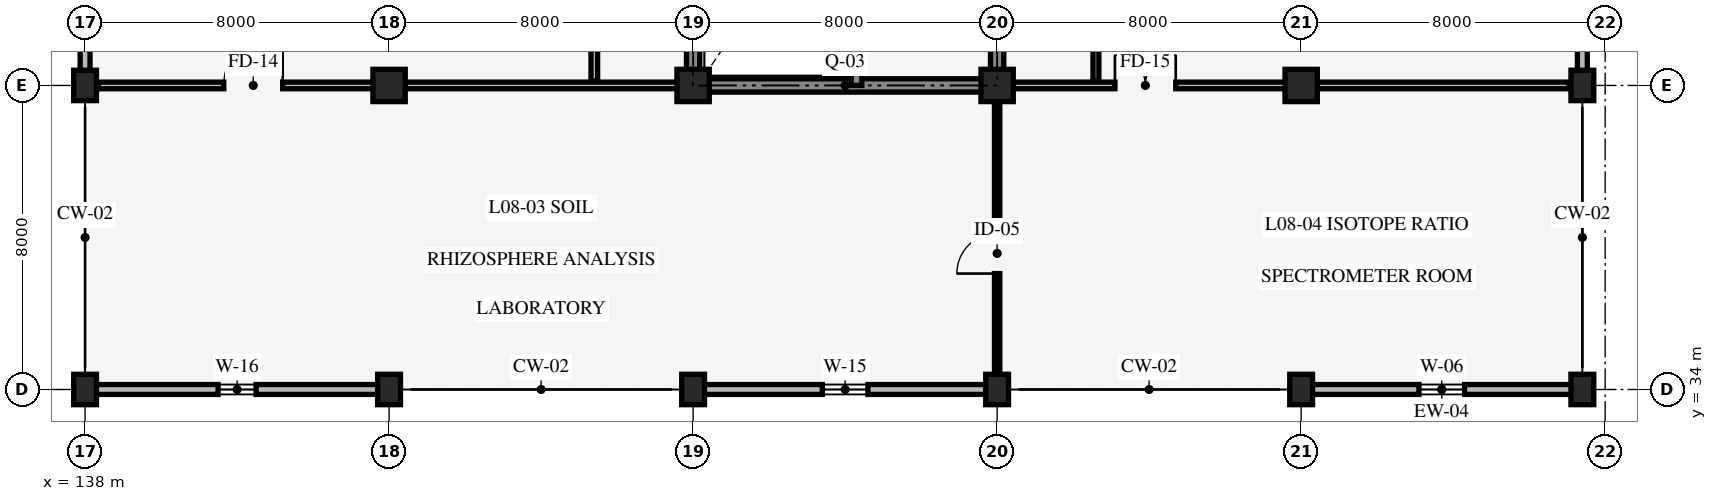
"""IFC4 building model, lengths in metres.
Left out: names, types, materials, properties, quantities, classifications, styles, units other than length and angle.
Written with IfcOpenShell. Run it as: python <this file> out.ifc"""

import sys

from ifc_helpers import new_model, si_unit, direction, frame, frame_2d, origin, origin_2d, place, context, subcontext, project, spatial, rectangle, extrude, element, fill, save


model = new_model("IFC4")
c1 = context("Model", 3, precision=1e-05, world=origin(), true_north=direction((0.0, 1.0)))
c2 = subcontext(c1, "Body", "Model", "MODEL_VIEW")
j1 = project(units=[si_unit("LENGTHUNIT", "METRE"), si_unit("PLANEANGLEUNIT", "RADIAN")], contexts=[c1])
p1 = place(None, origin())
s1 = spatial("IfcSite", under=j1, at=p1, CompositionType="ELEMENT")
p2 = place(p1, origin())
s2 = spatial("IfcBuilding", under=s1, at=p2, CompositionType="ELEMENT")
p3 = place(p2, frame((0.0, 0.0, 31.8)))
s3 = spatial("IfcBuildingStorey", under=s2, at=p3, CompositionType="ELEMENT", Elevation=31.8)
p4 = place(p3, frame((154.0, 42.0, 0.0), z_axis=(0.0, 0.0, 1.0), x_axis=(1.0, 0.0, 0.0)))
e1 = element("IfcWall", 1, at=p4, inside=s3, PredefinedType="SHEAR", context=c2, shape_type="SweptSolid", body=[
    extrude(rectangle(XDim=8.0, YDim=0.35, at=frame_2d((4.0, 0.0))), origin(), (0.0, 0.0, 1.0), 3.95),
])
p5 = place(p3, frame((162.0, 42.0, 0.0), z_axis=(0.0, 0.0, 1.0), x_axis=(0.0, 1.0, 0.0)))
e2 = element("IfcWall", 2, at=p5, inside=s3, PredefinedType="SHEAR", context=c2, shape_type="SweptSolid", body=[
    extrude(rectangle(XDim=8.0, YDim=0.35, at=frame_2d((4.0, 0.0))), origin(), (0.0, 0.0, 1.0), 3.95),
])
p6 = place(p5, frame((3.175, 0.0, 0.0)))
e3 = element("IfcOpeningElement", 3, at=p6, cuts=e2, PredefinedType="OPENING", context=c2, shape_type="SweptSolid", body=[
    extrude(rectangle(XDim=1.05, YDim=2.2, at=frame_2d((0.525, 1.1))), frame((0.0, 0.185, 0.0), z_axis=(0.0, -1.0, 0.0), x_axis=(1.0, 0.0, 0.0)), (0.0, 0.0, 1.0), 0.37),
])
p7 = place(p3, frame((154.0, 50.0, 0.0), z_axis=(0.0, 0.0, 1.0), x_axis=(0.0, -1.0, 0.0)))
e4 = element("IfcWall", 4, at=p7, inside=s3, PredefinedType="SHEAR", context=c2, shape_type="SweptSolid", body=[
    extrude(rectangle(XDim=8.0, YDim=0.35, at=frame_2d((4.0, 0.0))), origin(), (0.0, 0.0, 1.0), 3.95),
])
p8 = place(p3, frame((158.3, 42.0, 0.0), z_axis=(0.0, 0.0, 1.0), x_axis=(0.0, 1.0, 0.0)))
e5 = element("IfcWall", 5, at=p8, inside=s3, PredefinedType="SHEAR", context=c2, shape_type="SweptSolid", body=[
    extrude(rectangle(XDim=8.0, YDim=0.28, at=frame_2d((4.0, 0.0))), origin(), (0.0, 0.0, 1.0), 3.95),
])
for number, where, z_axis, x_axis in (
    (6, (138.0, 34.0, 0.0), (0.0, 0.0, 1.0), (1.0, 0.0, 0.0)),
    (7, (138.0, 42.0, 0.0), (0.0, 0.0, 1.0), (1.0, 0.0, 0.0)),
    (8, (146.0, 34.0, 0.0), (0.0, 0.0, 1.0), (1.0, 0.0, 0.0)),
):
    element("IfcColumn", number, at=place(p3, frame(where, z_axis=z_axis, x_axis=x_axis)), inside=s3, PredefinedType="COLUMN", context=c2, shape_type="SweptSolid", body=[
        extrude(rectangle(XDim=0.6, YDim=0.8, at=origin_2d()), origin(), (0.0, 0.0, 1.0), 4.2),
    ])
p9 = place(p3, frame((146.0, 42.0, 0.0), z_axis=(0.0, 0.0, 1.0), x_axis=(1.0, 0.0, 0.0)))
e9 = element("IfcColumn", 9, at=p9, inside=s3, PredefinedType="COLUMN", context=c2, shape_type="SweptSolid", body=[
    extrude(rectangle(XDim=0.85, YDim=0.85, at=origin_2d()), origin(), (0.0, 0.0, 1.0), 4.2),
])
p10 = place(p3, frame((154.0, 34.0, 0.0), z_axis=(0.0, 0.0, 1.0), x_axis=(1.0, 0.0, 0.0)))
e10 = element("IfcColumn", 10, at=p10, inside=s3, PredefinedType="COLUMN", context=c2, shape_type="SweptSolid", body=[
    extrude(rectangle(XDim=0.6, YDim=0.8, at=origin_2d()), origin(), (0.0, 0.0, 1.0), 4.2),
])
p11 = place(p3, frame((154.0, 42.0, 0.0), z_axis=(0.0, 0.0, 1.0), x_axis=(1.0, 0.0, 0.0)))
e11 = element("IfcColumn", 11, at=p11, inside=s3, PredefinedType="COLUMN", context=c2, shape_type="SweptSolid", body=[
    extrude(rectangle(XDim=0.85, YDim=0.85, at=origin_2d()), origin(), (0.0, 0.0, 1.0), 4.2),
])
p12 = place(p3, frame((162.0, 34.0, 0.0), z_axis=(0.0, 0.0, 1.0), x_axis=(1.0, 0.0, 0.0)))
e12 = element("IfcColumn", 12, at=p12, inside=s3, PredefinedType="COLUMN", context=c2, shape_type="SweptSolid", body=[
    extrude(rectangle(XDim=0.6, YDim=0.8, at=origin_2d()), origin(), (0.0, 0.0, 1.0), 4.2),
])
p13 = place(p3, frame((162.0, 42.0, 0.0), z_axis=(0.0, 0.0, 1.0), x_axis=(1.0, 0.0, 0.0)))
e13 = element("IfcColumn", 13, at=p13, inside=s3, PredefinedType="COLUMN", context=c2, shape_type="SweptSolid", body=[
    extrude(rectangle(XDim=0.85, YDim=0.85, at=origin_2d()), origin(), (0.0, 0.0, 1.0), 4.2),
])
p14 = place(p3, frame((170.0, 34.0, 0.0), z_axis=(0.0, 0.0, 1.0), x_axis=(1.0, 0.0, 0.0)))
e14 = element("IfcColumn", 14, at=p14, inside=s3, PredefinedType="COLUMN", context=c2, shape_type="SweptSolid", body=[
    extrude(rectangle(XDim=0.6, YDim=0.8, at=origin_2d()), origin(), (0.0, 0.0, 1.0), 4.2),
])
p15 = place(p3, frame((170.0, 42.0, 0.0), z_axis=(0.0, 0.0, 1.0), x_axis=(1.0, 0.0, 0.0)))
e15 = element("IfcColumn", 15, at=p15, inside=s3, PredefinedType="COLUMN", context=c2, shape_type="SweptSolid", body=[
    extrude(rectangle(XDim=0.85, YDim=0.85, at=origin_2d()), origin(), (0.0, 0.0, 1.0), 4.2),
])
for number, where, z_axis, x_axis in (
    (16, (177.4, 34.0, 0.0), (0.0, 0.0, 1.0), (1.0, 0.0, 0.0)),
    (17, (177.4, 42.0, 0.0), (0.0, 0.0, 1.0), (1.0, 0.0, 0.0)),
):
    element("IfcColumn", number, at=place(p3, frame(where, z_axis=z_axis, x_axis=x_axis)), inside=s3, PredefinedType="COLUMN", context=c2, shape_type="SweptSolid", body=[
        extrude(rectangle(XDim=0.6, YDim=0.8, at=origin_2d()), origin(), (0.0, 0.0, 1.0), 4.2),
    ])
p16 = place(p3, frame((177.4, 34.0, 0.0), z_axis=(0.0, 0.0, 1.0), x_axis=(-1.0, 0.0, 0.0)))
e18 = element("IfcWall", 18, at=p16, inside=s3, PredefinedType="STANDARD", context=c2, shape_type="SweptSolid", body=[
    extrude(rectangle(XDim=7.4, YDim=0.26, at=frame_2d((3.7, 0.0))), origin(), (0.0, 0.0, 1.0), 3.26),
])
p17 = place(p16, frame((3.1, 0.0, 0.85)))
e19 = element("IfcOpeningElement", 19, at=p17, cuts=e18, PredefinedType="OPENING", context=c2, shape_type="SweptSolid", body=[
    extrude(rectangle(XDim=1.2, YDim=1.2, at=frame_2d((0.6, 0.6))), frame((0.0, 0.14, 0.0), z_axis=(0.0, -1.0, 0.0), x_axis=(1.0, 0.0, 0.0)), (0.0, 0.0, 1.0), 0.28),
])
p18 = place(p3, frame((162.0, 34.0, 0.0), z_axis=(0.0, 0.0, 1.0), x_axis=(-1.0, 0.0, 0.0)))
e20 = element("IfcWall", 20, at=p18, inside=s3, PredefinedType="STANDARD", context=c2, shape_type="SweptSolid", body=[
    extrude(rectangle(XDim=8.0, YDim=0.26, at=frame_2d((4.0, 0.0))), origin(), (0.0, 0.0, 1.0), 3.26),
])
p19 = place(p18, frame((3.4, 0.0, 0.85)))
e21 = element("IfcOpeningElement", 21, at=p19, cuts=e20, PredefinedType="OPENING", context=c2, shape_type="SweptSolid", body=[
    extrude(rectangle(XDim=1.2, YDim=1.8, at=frame_2d((0.6, 0.9))), frame((0.0, 0.14, 0.0), z_axis=(0.0, -1.0, 0.0), x_axis=(1.0, 0.0, 0.0)), (0.0, 0.0, 1.0), 0.28),
])
p20 = place(p3, frame((146.0, 34.0, 0.0), z_axis=(0.0, 0.0, 1.0), x_axis=(-1.0, 0.0, 0.0)))
e22 = element("IfcWall", 22, at=p20, inside=s3, PredefinedType="STANDARD", context=c2, shape_type="SweptSolid", body=[
    extrude(rectangle(XDim=8.0, YDim=0.26, at=frame_2d((4.0, 0.0))), origin(), (0.0, 0.0, 1.0), 3.36),
])
p21 = place(p20, frame((3.5, 0.0, 0.85)))
e23 = element("IfcOpeningElement", 23, at=p21, cuts=e22, PredefinedType="OPENING", context=c2, shape_type="SweptSolid", body=[
    extrude(rectangle(XDim=1.0, YDim=1.5, at=frame_2d((0.5, 0.75))), frame((0.0, 0.14, 0.0), z_axis=(0.0, -1.0, 0.0), x_axis=(1.0, 0.0, 0.0)), (0.0, 0.0, 1.0), 0.28),
])
p22 = place(p3, frame((138.0, 42.0, 0.0), z_axis=(0.0, 0.0, 1.0), x_axis=(0.0, 1.0, 0.0)))
e24 = element("IfcWall", 24, at=p22, inside=s3, PredefinedType="STANDARD", context=c2, shape_type="SweptSolid", body=[
    extrude(rectangle(XDim=8.0, YDim=0.26, at=frame_2d((4.0, 0.0))), origin(), (0.0, 0.0, 1.0), 3.31),
])
p23 = place(p22, frame((2.75, 0.0, 0.85)))
e25 = element("IfcOpeningElement", 25, at=p23, cuts=e24, PredefinedType="OPENING", context=c2, shape_type="SweptSolid", body=[
    extrude(rectangle(XDim=2.5, YDim=1.8, at=frame_2d((1.25, 0.9))), frame((0.0, 0.14, 0.0), z_axis=(0.0, -1.0, 0.0), x_axis=(1.0, 0.0, 0.0)), (0.0, 0.0, 1.0), 0.28),
])
p24 = place(p3, frame((177.4, 50.0, 0.0), z_axis=(0.0, 0.0, 1.0), x_axis=(0.0, -1.0, 0.0)))
e26 = element("IfcWall", 26, at=p24, inside=s3, PredefinedType="STANDARD", context=c2, shape_type="SweptSolid", body=[
    extrude(rectangle(XDim=8.0, YDim=0.26, at=frame_2d((4.0, 0.0))), origin(), (0.0, 0.0, 1.0), 3.31),
])
p25 = place(p3, frame((151.4, 42.12, 0.0), z_axis=(0.0, 0.0, 1.0), x_axis=(0.0, 1.0, 0.0)))
e27 = element("IfcWall", 27, at=p25, inside=s3, PredefinedType="STANDARD", context=c2, shape_type="SweptSolid", body=[
    extrude(rectangle(XDim=11.76, YDim=0.175, at=frame_2d((5.88, 0.0))), origin(), (0.0, 0.0, 1.0), 3.9),
])
p26 = place(p25, frame((5.205, 0.0, 0.0)))
e28 = element("IfcOpeningElement", 28, at=p26, cuts=e27, PredefinedType="OPENING", context=c2, shape_type="SweptSolid", body=[
    extrude(rectangle(XDim=1.35, YDim=2.15, at=frame_2d((0.675, 1.075))), frame((0.0, 0.098, 0.0), z_axis=(0.0, -1.0, 0.0), x_axis=(1.0, 0.0, 0.0)), (0.0, 0.0, 1.0), 0.195),
])
p27 = place(p3, frame((164.6, 42.12, 0.0), z_axis=(0.0, 0.0, 1.0), x_axis=(0.0, 1.0, 0.0)))
e29 = element("IfcWall", 29, at=p27, inside=s3, PredefinedType="STANDARD", context=c2, shape_type="SweptSolid", body=[
    extrude(rectangle(XDim=7.8, YDim=0.155, at=frame_2d((3.9, 0.0))), origin(), (0.0, 0.0, 1.0), 3.9),
])
p28 = place(p27, frame((2.95, 0.0, 0.0)))
e30 = element("IfcOpeningElement", 30, at=p28, cuts=e29, PredefinedType="OPENING", context=c2, shape_type="SweptSolid", body=[
    extrude(rectangle(XDim=1.9, YDim=2.35, at=frame_2d((0.95, 1.175))), frame((0.0, 0.087, 0.0), z_axis=(0.0, -1.0, 0.0), x_axis=(1.0, 0.0, 0.0)), (0.0, 0.0, 1.0), 0.175),
])
p29 = place(p3, frame((138.35, 42.0, 0.0), z_axis=(0.0, 0.0, 1.0), x_axis=(1.0, 0.0, 0.0)))
e31 = element("IfcWall", 31, at=p29, inside=s3, PredefinedType="STANDARD", context=c2, shape_type="SweptSolid", body=[
    extrude(rectangle(XDim=15.3, YDim=0.175, at=frame_2d((7.65, 0.0))), origin(), (0.0, 0.0, 1.0), 3.26),
])
p30 = place(p29, frame((3.3, 0.0, 0.0)))
e32 = element("IfcOpeningElement", 32, at=p30, cuts=e31, PredefinedType="OPENING", context=c2, shape_type="SweptSolid", body=[
    extrude(rectangle(XDim=1.55, YDim=2.25, at=frame_2d((0.775, 1.125))), frame((0.0, 0.098, 0.0), z_axis=(0.0, -1.0, 0.0), x_axis=(1.0, 0.0, 0.0)), (0.0, 0.0, 1.0), 0.195),
])
p31 = place(p3, frame((162.0, 34.05, 0.0), z_axis=(0.0, 0.0, 1.0), x_axis=(0.0, 1.0, 0.0)))
e33 = element("IfcWall", 33, at=p31, inside=s3, PredefinedType="STANDARD", context=c2, shape_type="SweptSolid", body=[
    extrude(rectangle(XDim=7.83, YDim=0.14, at=frame_2d((3.915, 0.0))), origin(), (0.0, 0.0, 1.0), 3.31),
])
p32 = place(p31, frame((3.0, 0.0, 0.0)))
e34 = element("IfcOpeningElement", 34, at=p32, cuts=e33, PredefinedType="OPENING", context=c2, shape_type="SweptSolid", body=[
    extrude(rectangle(XDim=1.06, YDim=2.12, at=frame_2d((0.53, 1.06))), frame((0.0, 0.08, 0.0), z_axis=(0.0, -1.0, 0.0), x_axis=(1.0, 0.0, 0.0)), (0.0, 0.0, 1.0), 0.16),
])
p33 = place(p3, frame((162.35, 42.0, 0.0), z_axis=(0.0, 0.0, 1.0), x_axis=(1.0, 0.0, 0.0)))
e35 = element("IfcWall", 35, at=p33, inside=s3, PredefinedType="STANDARD", context=c2, shape_type="SweptSolid", body=[
    extrude(rectangle(XDim=14.7, YDim=0.175, at=frame_2d((7.35, 0.0))), origin(), (0.0, 0.0, 1.0), 3.26),
])
p34 = place(p33, frame((2.75, 0.0, 0.0)))
e36 = element("IfcOpeningElement", 36, at=p34, cuts=e35, PredefinedType="OPENING", context=c2, shape_type="SweptSolid", body=[
    extrude(rectangle(XDim=1.6, YDim=2.25, at=frame_2d((0.8, 1.125))), frame((0.0, 0.098, 0.0), z_axis=(0.0, -1.0, 0.0), x_axis=(1.0, 0.0, 0.0)), (0.0, 0.0, 1.0), 0.195),
])
p35 = place(p17, origin())
e37 = element("IfcWindow", 37, at=p35, inside=s3, PartitioningType="SINGLE_PANEL", PredefinedType="WINDOW", context=c2, shape_type="SweptSolid", body=[
    extrude(rectangle(XDim=1.2, YDim=1.2, at=frame_2d((0.6, 0.6))), frame((0.0, 0.03, 0.0), z_axis=(0.0, -1.0, 0.0), x_axis=(1.0, 0.0, 0.0)), (0.0, 0.0, 1.0), 0.06),
])
fill(e19, e37)
p36 = place(p19, origin())
e38 = element("IfcWindow", 38, at=p36, inside=s3, PartitioningType="SINGLE_PANEL", PredefinedType="WINDOW", context=c2, shape_type="SweptSolid", body=[
    extrude(rectangle(XDim=1.2, YDim=1.8, at=frame_2d((0.6, 0.9))), frame((0.0, 0.03, 0.0), z_axis=(0.0, -1.0, 0.0), x_axis=(1.0, 0.0, 0.0)), (0.0, 0.0, 1.0), 0.06),
])
fill(e21, e38)
p37 = place(p21, origin())
e39 = element("IfcWindow", 39, at=p37, inside=s3, PartitioningType="SINGLE_PANEL", PredefinedType="WINDOW", context=c2, shape_type="SweptSolid", body=[
    extrude(rectangle(XDim=1.0, YDim=1.5, at=frame_2d((0.5, 0.75))), frame((0.0, 0.03, 0.0), z_axis=(0.0, -1.0, 0.0), x_axis=(1.0, 0.0, 0.0)), (0.0, 0.0, 1.0), 0.06),
])
fill(e23, e39)
p38 = place(p30, origin())
e40 = element("IfcDoor", 40, at=p38, inside=s3, OperationType="SINGLE_SWING_RIGHT", PredefinedType="DOOR", context=c2, shape_type="SweptSolid", body=[
    extrude(rectangle(XDim=1.55, YDim=2.25, at=frame_2d((0.775, 1.125))), frame((0.0, 0.025, 0.0), z_axis=(0.0, -1.0, 0.0), x_axis=(1.0, 0.0, 0.0)), (0.0, 0.0, 1.0), 0.05),
])
fill(e32, e40)
p39 = place(p32, origin())
e41 = element("IfcDoor", 41, at=p39, inside=s3, OperationType="SINGLE_SWING_LEFT", PredefinedType="DOOR", context=c2, shape_type="SweptSolid", body=[
    extrude(rectangle(XDim=1.06, YDim=2.12, at=frame_2d((0.53, 1.06))), frame((0.0, 0.025, 0.0), z_axis=(0.0, -1.0, 0.0), x_axis=(1.0, 0.0, 0.0)), (0.0, 0.0, 1.0), 0.05),
])
fill(e34, e41)
p40 = place(p34, origin())
e42 = element("IfcDoor", 42, at=p40, inside=s3, OperationType="DOUBLE_DOOR_SINGLE_SWING", PredefinedType="DOOR", context=c2, shape_type="SweptSolid", body=[
    extrude(rectangle(XDim=1.6, YDim=2.25, at=frame_2d((0.8, 1.125))), frame((0.0, 0.025, 0.0), z_axis=(0.0, -1.0, 0.0), x_axis=(1.0, 0.0, 0.0)), (0.0, 0.0, 1.0), 0.05),
])
fill(e36, e42)
save(model, sys.argv[1])
